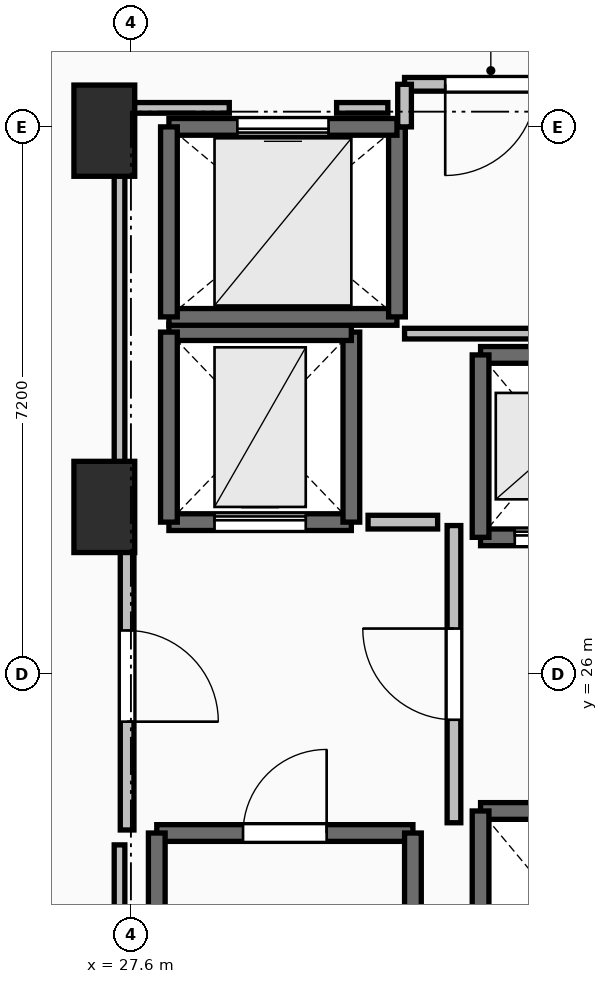
"""IFC4 building model, lengths in metres.
Left out: names, types, materials, properties, quantities, classifications, styles, units other than length and angle.
Written with IfcOpenShell. Run it as: python <this file> out.ifc"""

import sys

from ifc_helpers import new_model, si_unit, direction, frame, frame_2d, origin, origin_2d, place, context, subcontext, project, spatial, rectangle, extrude, element, fill, save


model = new_model("IFC4")
c1 = context("Model", 3, precision=1e-05, world=origin(), true_north=direction((0.0, 1.0)))
c2 = subcontext(c1, "Body", "Model", "MODEL_VIEW")
j1 = project(units=[si_unit("LENGTHUNIT", "METRE"), si_unit("PLANEANGLEUNIT", "RADIAN")], contexts=[c1])
p1 = place(None, origin())
s1 = spatial("IfcSite", under=j1, at=p1, CompositionType="ELEMENT")
p2 = place(p1, origin())
s2 = spatial("IfcBuilding", under=s1, at=p2, CompositionType="ELEMENT")
p3 = place(p2, frame((0.0, 0.0, 34.5)))
s3 = spatial("IfcBuildingStorey", under=s2, at=p3, CompositionType="ELEMENT", Elevation=34.5)
for number, where, z_axis, x_axis in (
    (1, (27.25, 28.2, 0.0), (0.0, 0.0, 1.0), (1.0, 0.0, 0.0)),
    (2, (27.25, 33.15, 0.0), (0.0, 0.0, 1.0), (1.0, 0.0, 0.0)),
):
    element("IfcColumn", number, at=place(p3, frame(where, z_axis=z_axis, x_axis=x_axis)), inside=s3, PredefinedType="PILASTER", context=c2, shape_type="SweptSolid", body=[
        extrude(rectangle(XDim=0.8, YDim=1.2, at=origin_2d()), origin(), (0.0, 0.0, 1.0), 3.5),
    ])
p4 = place(p3, frame((27.94, 23.91, 0.0), z_axis=(0.0, 0.0, 1.0), x_axis=(1.0, 0.0, 0.0)))
e3 = element("IfcWall", 3, at=p4, inside=s3, PredefinedType="SOLIDWALL", context=c2, shape_type="SweptSolid", body=[
    extrude(rectangle(XDim=3.37, YDim=0.22, at=frame_2d((1.685, 0.0))), origin(), (0.0, 0.0, 1.0), 3.24),
])
p5 = place(p4, frame((1.135, 0.0, 0.0)))
e4 = element("IfcOpeningElement", 4, at=p5, cuts=e3, PredefinedType="OPENING", context=c2, shape_type="SweptSolid", body=[
    extrude(rectangle(XDim=1.1, YDim=2.15, at=frame_2d((0.55, 1.075))), frame((0.0, 0.125, 0.0), z_axis=(0.0, -1.0, 0.0), x_axis=(1.0, 0.0, 0.0)), (0.0, 0.0, 1.0), 0.25),
])
for number, where, z_axis, x_axis in (
    (5, (31.31, 23.91, 0.0), (0.0, 0.0, 1.0), (0.0, -1.0, 0.0)),
    (6, (27.94, 16.49, 0.0), (0.0, 0.0, 1.0), (0.0, 1.0, 0.0)),
):
    element("IfcWall", number, at=place(p3, frame(where, z_axis=z_axis, x_axis=x_axis)), inside=s3, PredefinedType="SOLIDWALL", context=c2, shape_type="SweptSolid", body=[
        extrude(rectangle(XDim=7.42, YDim=0.22, at=frame_2d((3.71, 0.0))), origin(), (0.0, 0.0, 1.0), 3.24),
    ])
p6 = place(p3, frame((32.2, 27.8, 0.0), z_axis=(0.0, 0.0, 1.0), x_axis=(1.0, 0.0, 0.0)))
e7 = element("IfcWall", 7, at=p6, inside=s3, PredefinedType="SOLIDWALL", context=c2, shape_type="SweptSolid", body=[
    extrude(rectangle(XDim=2.0, YDim=0.22, at=frame_2d((1.0, 0.0))), origin(), (0.0, 0.0, 1.0), 3.24),
])
p7 = place(p6, frame((0.45, 0.0, 0.0)))
e8 = element("IfcOpeningElement", 8, at=p7, cuts=e7, PredefinedType="OPENING", context=c2, shape_type="SweptSolid", body=[
    extrude(rectangle(XDim=1.1, YDim=2.2, at=frame_2d((0.55, 1.1))), frame((0.0, 0.125, 0.0), z_axis=(0.0, -1.0, 0.0), x_axis=(1.0, 0.0, 0.0)), (0.0, 0.0, 1.0), 0.25),
])
p8 = place(p3, frame((34.2, 30.2, 0.0), z_axis=(0.0, 0.0, 1.0), x_axis=(-1.0, 0.0, 0.0)))
e9 = element("IfcWall", 9, at=p8, inside=s3, PredefinedType="SOLIDWALL", context=c2, shape_type="SweptSolid", body=[
    extrude(rectangle(XDim=2.0, YDim=0.22, at=frame_2d((1.0, 0.0))), origin(), (0.0, 0.0, 1.0), 3.24),
])
p9 = place(p3, frame((32.2, 30.2, 0.0), z_axis=(0.0, 0.0, 1.0), x_axis=(0.0, -1.0, 0.0)))
e10 = element("IfcWall", 10, at=p9, inside=s3, PredefinedType="SOLIDWALL", context=c2, shape_type="SweptSolid", body=[
    extrude(rectangle(XDim=2.4, YDim=0.22, at=frame_2d((1.2, 0.0))), origin(), (0.0, 0.0, 1.0), 3.24),
])
p10 = place(p3, frame((34.2, 24.2, 0.0), z_axis=(0.0, 0.0, 1.0), x_axis=(-1.0, 0.0, 0.0)))
e11 = element("IfcWall", 11, at=p10, inside=s3, PredefinedType="SOLIDWALL", context=c2, shape_type="SweptSolid", body=[
    extrude(rectangle(XDim=2.0, YDim=0.22, at=frame_2d((1.0, 0.0))), origin(), (0.0, 0.0, 1.0), 3.24),
])
p11 = place(p3, frame((32.2, 24.2, 0.0), z_axis=(0.0, 0.0, 1.0), x_axis=(0.0, -1.0, 0.0)))
e12 = element("IfcWall", 12, at=p11, inside=s3, PredefinedType="SOLIDWALL", context=c2, shape_type="SweptSolid", body=[
    extrude(rectangle(XDim=2.4, YDim=0.22, at=frame_2d((1.2, 0.0))), origin(), (0.0, 0.0, 1.0), 3.24),
])
p12 = place(p3, frame((28.1, 28.0, 0.0), z_axis=(0.0, 0.0, 1.0), x_axis=(1.0, 0.0, 0.0)))
e13 = element("IfcWall", 13, at=p12, inside=s3, PredefinedType="SHEAR", context=c2, shape_type="SweptSolid", body=[
    extrude(rectangle(XDim=2.4, YDim=0.22, at=frame_2d((1.2, 0.0))), origin(), (0.0, 0.0, 1.0), 3.24),
])
p13 = place(p12, frame((0.6, 0.0, 0.0)))
e14 = element("IfcOpeningElement", 14, at=p13, cuts=e13, PredefinedType="OPENING", context=c2, shape_type="SweptSolid", body=[
    extrude(rectangle(XDim=1.2, YDim=2.2, at=frame_2d((0.6, 1.1))), frame((0.0, 0.125, 0.0), z_axis=(0.0, -1.0, 0.0), x_axis=(1.0, 0.0, 0.0)), (0.0, 0.0, 1.0), 0.25),
])
p14 = place(p3, frame((30.5, 28.0, 0.0), z_axis=(0.0, 0.0, 1.0), x_axis=(0.0, 1.0, 0.0)))
e15 = element("IfcWall", 15, at=p14, inside=s3, PredefinedType="SHEAR", context=c2, shape_type="SweptSolid", body=[
    extrude(rectangle(XDim=2.5, YDim=0.22, at=frame_2d((1.25, 0.0))), origin(), (0.0, 0.0, 1.0), 3.24),
])
p15 = place(p3, frame((30.5, 30.5, 0.0), z_axis=(0.0, 0.0, 1.0), x_axis=(-1.0, 0.0, 0.0)))
e16 = element("IfcWall", 16, at=p15, inside=s3, PredefinedType="SHEAR", context=c2, shape_type="SweptSolid", body=[
    extrude(rectangle(XDim=2.4, YDim=0.22, at=frame_2d((1.2, 0.0))), origin(), (0.0, 0.0, 1.0), 3.24),
])
p16 = place(p3, frame((28.1, 30.5, 0.0), z_axis=(0.0, 0.0, 1.0), x_axis=(0.0, -1.0, 0.0)))
e17 = element("IfcWall", 17, at=p16, inside=s3, PredefinedType="SHEAR", context=c2, shape_type="SweptSolid", body=[
    extrude(rectangle(XDim=2.5, YDim=0.22, at=frame_2d((1.25, 0.0))), origin(), (0.0, 0.0, 1.0), 3.24),
])
p17 = place(p3, frame((28.1, 30.7, 0.0), z_axis=(0.0, 0.0, 1.0), x_axis=(1.0, 0.0, 0.0)))
e18 = element("IfcWall", 18, at=p17, inside=s3, PredefinedType="SOLIDWALL", context=c2, shape_type="SweptSolid", body=[
    extrude(rectangle(XDim=3.0, YDim=0.22, at=frame_2d((1.5, 0.0))), origin(), (0.0, 0.0, 1.0), 3.24),
])
p18 = place(p3, frame((31.1, 30.7, 0.0), z_axis=(0.0, 0.0, 1.0), x_axis=(0.0, 1.0, 0.0)))
e19 = element("IfcWall", 19, at=p18, inside=s3, PredefinedType="SOLIDWALL", context=c2, shape_type="SweptSolid", body=[
    extrude(rectangle(XDim=2.5, YDim=0.22, at=frame_2d((1.25, 0.0))), origin(), (0.0, 0.0, 1.0), 3.24),
])
p19 = place(p3, frame((31.1, 33.2, 0.0), z_axis=(0.0, 0.0, 1.0), x_axis=(-1.0, 0.0, 0.0)))
e20 = element("IfcWall", 20, at=p19, inside=s3, PredefinedType="SOLIDWALL", context=c2, shape_type="SweptSolid", body=[
    extrude(rectangle(XDim=3.0, YDim=0.22, at=frame_2d((1.5, 0.0))), origin(), (0.0, 0.0, 1.0), 3.24),
])
p20 = place(p19, frame((0.9, 0.0, 0.0)))
e21 = element("IfcOpeningElement", 21, at=p20, cuts=e20, PredefinedType="OPENING", context=c2, shape_type="SweptSolid", body=[
    extrude(rectangle(XDim=1.2, YDim=2.2, at=frame_2d((0.6, 1.1))), frame((0.0, 0.125, 0.0), z_axis=(0.0, -1.0, 0.0), x_axis=(1.0, 0.0, 0.0)), (0.0, 0.0, 1.0), 0.25),
])
p21 = place(p3, frame((28.1, 33.2, 0.0), z_axis=(0.0, 0.0, 1.0), x_axis=(0.0, -1.0, 0.0)))
e22 = element("IfcWall", 22, at=p21, inside=s3, PredefinedType="SOLIDWALL", context=c2, shape_type="SweptSolid", body=[
    extrude(rectangle(XDim=2.5, YDim=0.22, at=frame_2d((1.25, 0.0))), origin(), (0.0, 0.0, 1.0), 3.24),
])
p22 = place(p3, frame((31.85, 24.045, 0.0), z_axis=(0.0, 0.0, 1.0), x_axis=(0.0, 1.0, 0.0)))
e23 = element("IfcWall", 23, at=p22, inside=s3, PredefinedType="PARTITIONING", context=c2, shape_type="SweptSolid", body=[
    extrude(rectangle(XDim=3.91, YDim=0.18, at=frame_2d((1.955, 0.0))), origin(), (0.0, 0.0, 1.0), 3.24),
])
p23 = place(p22, frame((1.355, 0.0, 0.0)))
e24 = element("IfcOpeningElement", 24, at=p23, cuts=e23, PredefinedType="OPENING", context=c2, shape_type="SweptSolid", body=[
    extrude(rectangle(XDim=1.2, YDim=2.15, at=frame_2d((0.6, 1.075))), frame((0.0, 0.105, 0.0), z_axis=(0.0, -1.0, 0.0), x_axis=(1.0, 0.0, 0.0)), (0.0, 0.0, 1.0), 0.21),
])
p24 = place(p3, frame((27.55, 28.0, 0.0), z_axis=(0.0, 0.0, 1.0), x_axis=(0.0, -1.0, 0.0)))
e25 = element("IfcWall", 25, at=p24, inside=s3, PredefinedType="PARTITIONING", context=c2, shape_type="SweptSolid", body=[
    extrude(rectangle(XDim=4.05, YDim=0.18, at=frame_2d((2.025, 0.0))), origin(), (0.0, 0.0, 1.0), 3.24),
])
p25 = place(p24, frame((1.425, 0.0, 0.0)))
e26 = element("IfcOpeningElement", 26, at=p25, cuts=e25, PredefinedType="OPENING", context=c2, shape_type="SweptSolid", body=[
    extrude(rectangle(XDim=1.2, YDim=2.15, at=frame_2d((0.6, 1.075))), frame((0.0, 0.105, 0.0), z_axis=(0.0, -1.0, 0.0), x_axis=(1.0, 0.0, 0.0)), (0.0, 0.0, 1.0), 0.21),
])
p26 = place(p3, frame((33.47, 33.76, 0.0), z_axis=(0.0, 0.0, 1.0), x_axis=(-1.0, 0.0, 0.0)))
e27 = element("IfcWall", 27, at=p26, inside=s3, PredefinedType="PARTITIONING", context=c2, shape_type="SweptSolid", body=[
    extrude(rectangle(XDim=2.27, YDim=0.18, at=frame_2d((1.135, 0.0))), origin(), (0.0, 0.0, 1.0), 3.24),
])
p27 = place(p26, frame((0.535, 0.0, 0.0)))
e28 = element("IfcOpeningElement", 28, at=p27, cuts=e27, PredefinedType="OPENING", context=c2, shape_type="SweptSolid", body=[
    extrude(rectangle(XDim=1.2, YDim=2.15, at=frame_2d((0.6, 1.075))), frame((0.0, 0.105, 0.0), z_axis=(0.0, -1.0, 0.0), x_axis=(1.0, 0.0, 0.0)), (0.0, 0.0, 1.0), 0.21),
])
p28 = place(p3, frame((31.2, 33.76, 0.0), z_axis=(0.0, 0.0, 1.0), x_axis=(0.0, -1.0, 0.0)))
e29 = element("IfcWall", 29, at=p28, inside=s3, PredefinedType="PARTITIONING", context=c2, shape_type="SweptSolid", body=[
    extrude(rectangle(XDim=0.56, YDim=0.18, at=frame_2d((0.28, 0.0))), origin(), (0.0, 0.0, 1.0), 3.24),
])
p29 = place(p3, frame((31.635, 28.0, 0.0), z_axis=(0.0, 0.0, 1.0), x_axis=(-1.0, 0.0, 0.0)))
e30 = element("IfcWall", 30, at=p29, inside=s3, PredefinedType="PARTITIONING", context=c2, shape_type="SweptSolid", body=[
    extrude(rectangle(XDim=0.915, YDim=0.18, at=frame_2d((0.458, 0.0))), origin(), (0.0, 0.0, 1.0), 3.24),
])
p30 = place(p3, frame((31.2, 30.48, 0.0), z_axis=(0.0, 0.0, 1.0), x_axis=(1.0, 0.0, 0.0)))
e31 = element("IfcWall", 31, at=p30, inside=s3, PredefinedType="PARTITIONING", context=c2, shape_type="SweptSolid", body=[
    extrude(rectangle(XDim=2.05, YDim=0.14, at=frame_2d((1.025, 0.0))), origin(), (0.0, 0.0, 1.0), 3.24),
])
p31 = place(p3, frame((27.45, 16.24, 0.0), z_axis=(0.0, 0.0, 1.0), x_axis=(0.0, 1.0, 0.0)))
e32 = element("IfcWall", 32, at=p31, inside=s3, PredefinedType="PARTITIONING", context=c2, shape_type="SweptSolid", body=[
    extrude(rectangle(XDim=7.514, YDim=0.14, at=frame_2d((3.757, 0.0))), origin(), (0.0, 0.0, 1.0), 2.432),
])
p32 = place(p3, frame((27.45, 28.196, 0.0), z_axis=(0.0, 0.0, 1.0), x_axis=(0.0, 1.0, 0.0)))
e33 = element("IfcWall", 33, at=p32, inside=s3, PredefinedType="PARTITIONING", context=c2, shape_type="SweptSolid", body=[
    extrude(rectangle(XDim=5.254, YDim=0.14, at=frame_2d((2.627, 0.0))), origin(), (0.0, 0.0, 1.0), 2.432),
])
p33 = place(p3, frame((27.45, 33.45, 0.0), z_axis=(0.0, 0.0, 1.0), x_axis=(1.0, 0.0, 0.0)))
e34 = element("IfcWall", 34, at=p33, inside=s3, PredefinedType="PARTITIONING", context=c2, shape_type="SweptSolid", body=[
    extrude(rectangle(XDim=1.444, YDim=0.14, at=frame_2d((0.722, 0.0))), origin(), (0.0, 0.0, 1.0), 2.432),
])
p34 = place(p3, frame((30.306, 33.45, 0.0), z_axis=(0.0, 0.0, 1.0), x_axis=(1.0, 0.0, 0.0)))
e35 = element("IfcWall", 35, at=p34, inside=s3, PredefinedType="PARTITIONING", context=c2, shape_type="SweptSolid", body=[
    extrude(rectangle(XDim=0.674, YDim=0.14, at=frame_2d((0.337, 0.0))), origin(), (0.0, 0.0, 1.0), 3.24),
])
p35 = place(p5, origin())
e36 = element("IfcDoor", 36, at=p35, inside=s3, OperationType="SINGLE_SWING_RIGHT", PredefinedType="DOOR", context=c2, shape_type="SweptSolid", body=[
    extrude(rectangle(XDim=1.1, YDim=2.15, at=frame_2d((0.55, 1.075))), frame((0.0, 0.025, 0.0), z_axis=(0.0, -1.0, 0.0), x_axis=(1.0, 0.0, 0.0)), (0.0, 0.0, 1.0), 0.05),
])
fill(e4, e36)
p36 = place(p7, origin())
e37 = element("IfcDoor", 37, at=p36, inside=s3, OperationType="SLIDING_TO_LEFT", PredefinedType="DOOR", context=c2, shape_type="SweptSolid", body=[
    extrude(rectangle(XDim=1.1, YDim=2.2, at=frame_2d((0.55, 1.1))), frame((0.0, 0.025, 0.0), z_axis=(0.0, -1.0, 0.0), x_axis=(1.0, 0.0, 0.0)), (0.0, 0.0, 1.0), 0.05),
])
fill(e8, e37)
p37 = place(p13, origin())
e38 = element("IfcDoor", 38, at=p37, inside=s3, OperationType="SLIDING_TO_LEFT", PredefinedType="DOOR", context=c2, shape_type="SweptSolid", body=[
    extrude(rectangle(XDim=1.2, YDim=2.2, at=frame_2d((0.6, 1.1))), frame((0.0, 0.025, 0.0), z_axis=(0.0, -1.0, 0.0), x_axis=(1.0, 0.0, 0.0)), (0.0, 0.0, 1.0), 0.05),
])
fill(e14, e38)
p38 = place(p20, origin())
e39 = element("IfcDoor", 39, at=p38, inside=s3, OperationType="SLIDING_TO_LEFT", PredefinedType="DOOR", context=c2, shape_type="SweptSolid", body=[
    extrude(rectangle(XDim=1.2, YDim=2.2, at=frame_2d((0.6, 1.1))), frame((0.0, 0.025, 0.0), z_axis=(0.0, -1.0, 0.0), x_axis=(1.0, 0.0, 0.0)), (0.0, 0.0, 1.0), 0.05),
])
fill(e21, e39)
p39 = place(p23, origin())
e40 = element("IfcDoor", 40, at=p39, inside=s3, OperationType="SINGLE_SWING_RIGHT", PredefinedType="DOOR", context=c2, shape_type="SweptSolid", body=[
    extrude(rectangle(XDim=1.2, YDim=2.15, at=frame_2d((0.6, 1.075))), frame((0.0, 0.025, 0.0), z_axis=(0.0, -1.0, 0.0), x_axis=(1.0, 0.0, 0.0)), (0.0, 0.0, 1.0), 0.05),
])
fill(e24, e40)
p40 = place(p25, origin())
e41 = element("IfcDoor", 41, at=p40, inside=s3, OperationType="SINGLE_SWING_RIGHT", PredefinedType="DOOR", context=c2, shape_type="SweptSolid", body=[
    extrude(rectangle(XDim=1.2, YDim=2.15, at=frame_2d((0.6, 1.075))), frame((0.0, 0.025, 0.0), z_axis=(0.0, -1.0, 0.0), x_axis=(1.0, 0.0, 0.0)), (0.0, 0.0, 1.0), 0.05),
])
fill(e26, e41)
p41 = place(p27, origin())
e42 = element("IfcDoor", 42, at=p41, inside=s3, OperationType="SINGLE_SWING_RIGHT", PredefinedType="DOOR", context=c2, shape_type="SweptSolid", body=[
    extrude(rectangle(XDim=1.2, YDim=2.15, at=frame_2d((0.6, 1.075))), frame((0.0, 0.025, 0.0), z_axis=(0.0, -1.0, 0.0), x_axis=(1.0, 0.0, 0.0)), (0.0, 0.0, 1.0), 0.05),
])
fill(e28, e42)
save(model, sys.argv[1])
